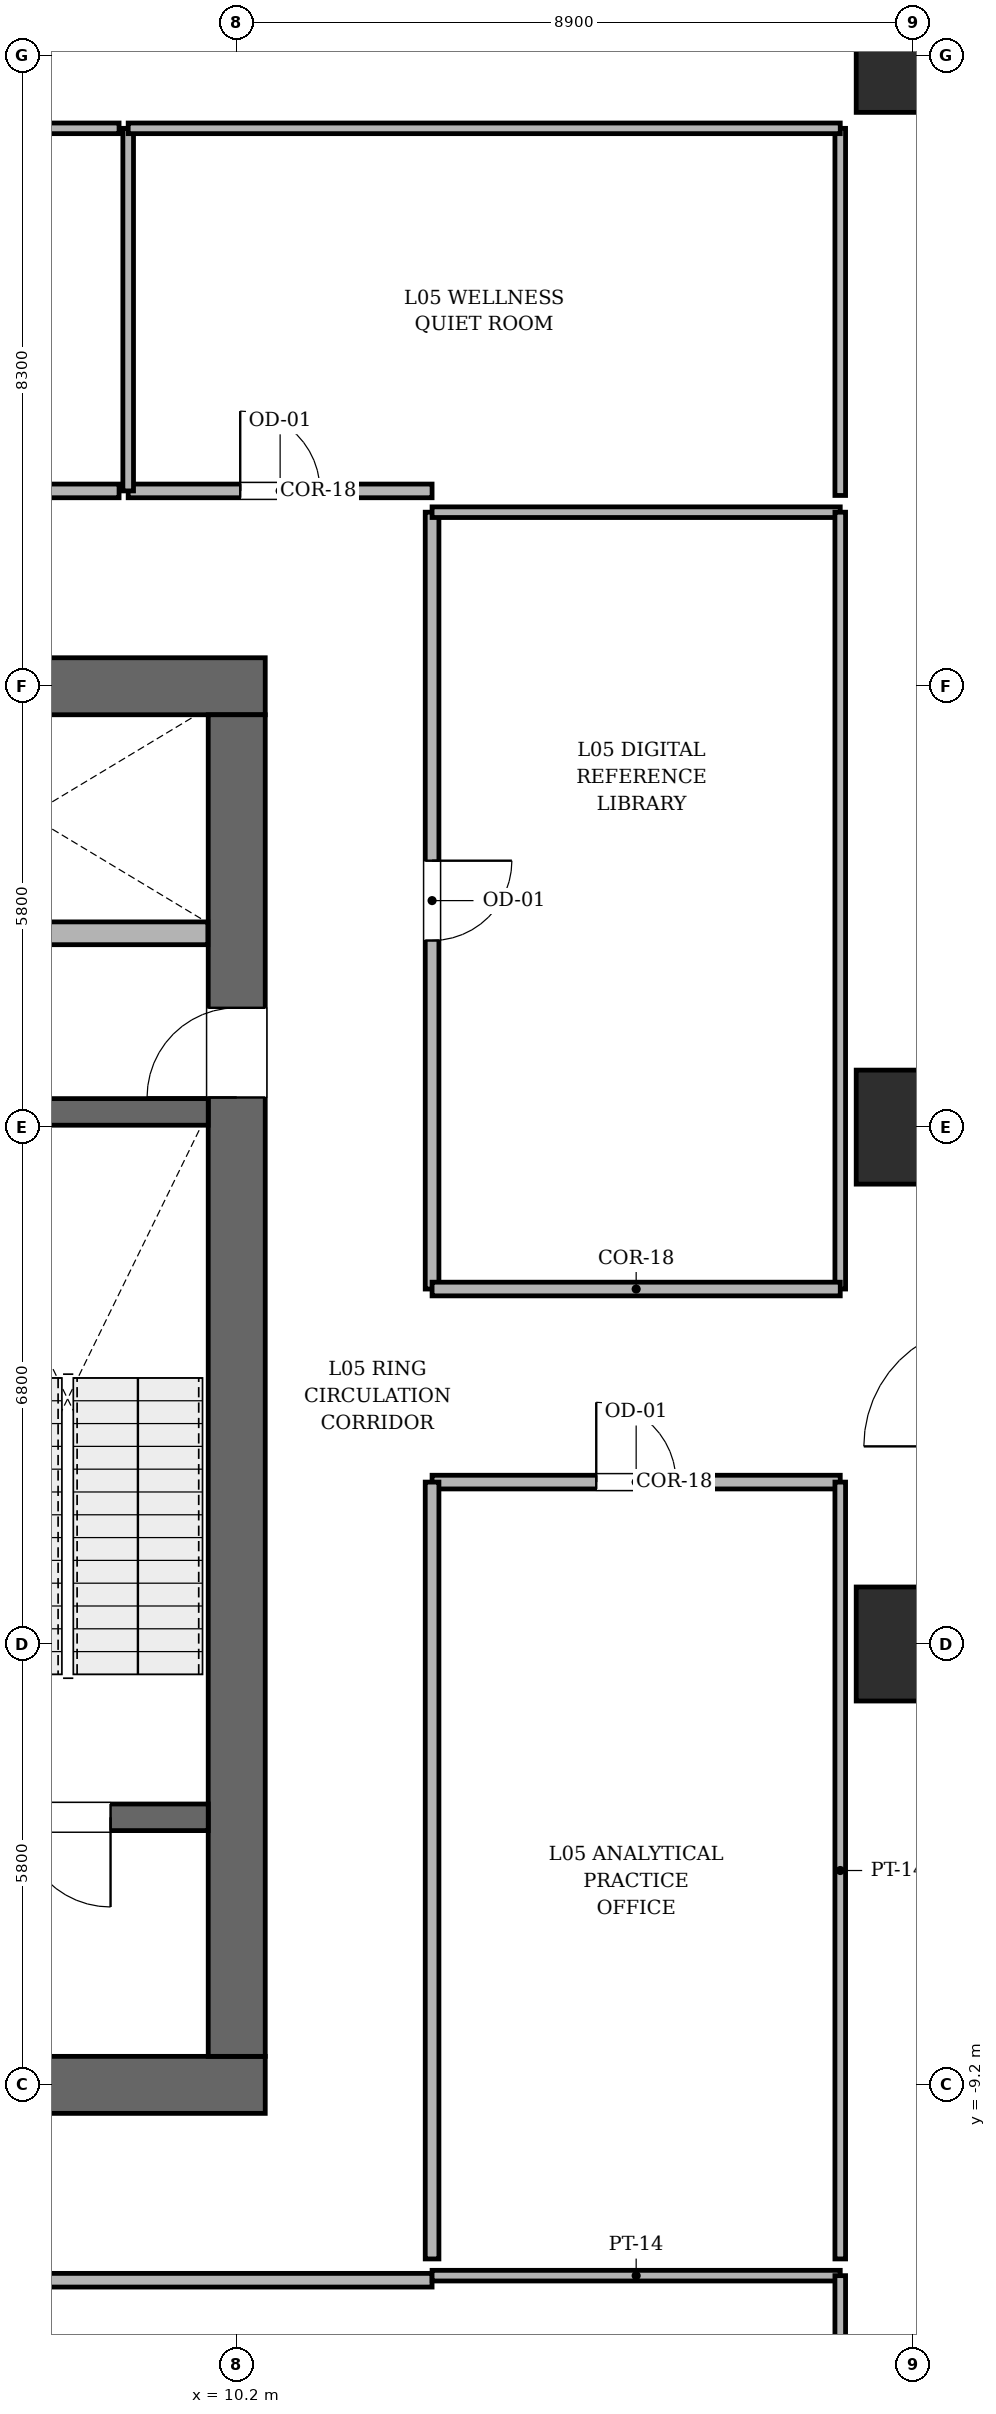
"""IFC4 building model, lengths in metres.
Left out: names, types, materials, properties, quantities, classifications, styles, units other than length and angle.
Written with IfcOpenShell. Run it as: python <this file> out.ifc"""

import sys

from ifc_helpers import new_model, si_unit, direction, frame, frame_2d, origin, origin_2d, place, context, subcontext, project, spatial, rectangle, hollow_rectangle, extrude, element, fill, save


model = new_model("IFC4")
c1 = context("Model", 3, precision=1e-05, world=origin(), true_north=direction((0.0, 1.0)))
c2 = subcontext(c1, "Body", "Model", "MODEL_VIEW")
j1 = project(units=[si_unit("LENGTHUNIT", "METRE"), si_unit("PLANEANGLEUNIT", "RADIAN")], contexts=[c1])
p1 = place(None, origin())
s1 = spatial("IfcSite", under=j1, at=p1, CompositionType="ELEMENT")
p2 = place(p1, origin())
s2 = spatial("IfcBuilding", under=s1, at=p2, CompositionType="ELEMENT")
p3 = place(p2, frame((0.0, 0.0, 28.2)))
s3 = spatial("IfcBuildingStorey", under=s2, at=p3, CompositionType="ELEMENT", Elevation=28.2)
p4 = place(p3, frame((10.575, -9.2, 0.0), z_axis=(0.0, 0.0, 1.0), x_axis=(-1.0, 0.0, 0.0)))
e1 = element("IfcWall", 1, at=p4, inside=s3, PredefinedType="SHEAR", context=c2, shape_type="SweptSolid", body=[
    extrude(rectangle(XDim=21.15, YDim=0.75, at=frame_2d((10.575, 0.0))), origin(), (0.0, 0.0, 1.0), 4.05),
])
p5 = place(p4, frame((2.85, 0.0, 0.0)))
e2 = element("IfcOpeningElement", 2, at=p5, cuts=e1, PredefinedType="OPENING", context=c2, shape_type="SweptSolid", body=[
    extrude(rectangle(XDim=1.25, YDim=2.25, at=frame_2d((0.625, 1.125))), frame((0.0, 0.385, 0.0), z_axis=(0.0, -1.0, 0.0), x_axis=(1.0, 0.0, 0.0)), (0.0, 0.0, 1.0), 0.77),
])
p6 = place(p4, frame((17.05, 0.0, 0.0)))
e3 = element("IfcOpeningElement", 3, at=p6, cuts=e1, PredefinedType="OPENING", context=c2, shape_type="SweptSolid", body=[
    extrude(rectangle(XDim=1.25, YDim=2.25, at=frame_2d((0.625, 1.125))), frame((0.0, 0.385, 0.0), z_axis=(0.0, -1.0, 0.0), x_axis=(1.0, 0.0, 0.0)), (0.0, 0.0, 1.0), 0.77),
])
p7 = place(p3, frame((-10.575, 9.2, 0.0), z_axis=(0.0, 0.0, 1.0), x_axis=(1.0, 0.0, 0.0)))
e4 = element("IfcWall", 4, at=p7, inside=s3, PredefinedType="SHEAR", context=c2, shape_type="SweptSolid", body=[
    extrude(rectangle(XDim=21.15, YDim=0.75, at=frame_2d((10.575, 0.0))), origin(), (0.0, 0.0, 1.0), 4.05),
])
p8 = place(p3, frame((10.2, 8.825, 0.0), z_axis=(0.0, 0.0, 1.0), x_axis=(0.0, -1.0, 0.0)))
e5 = element("IfcWall", 5, at=p8, inside=s3, PredefinedType="SHEAR", context=c2, shape_type="SweptSolid", body=[
    extrude(rectangle(XDim=17.65, YDim=0.75, at=frame_2d((8.825, 0.0))), origin(), (0.0, 0.0, 1.0), 4.05),
])
p9 = place(p8, frame((3.855, 0.0, 0.0)))
e6 = element("IfcOpeningElement", 6, at=p9, cuts=e5, PredefinedType="OPENING", context=c2, shape_type="SweptSolid", body=[
    extrude(rectangle(XDim=1.18, YDim=2.2, at=frame_2d((0.59, 1.1))), frame((0.0, 0.385, 0.0), z_axis=(0.0, -1.0, 0.0), x_axis=(1.0, 0.0, 0.0)), (0.0, 0.0, 1.0), 0.77),
])
p10 = place(p3, frame((4.65, -5.68, 0.0), z_axis=(0.0, 0.0, 1.0), x_axis=(1.0, 0.0, 0.0)))
e7 = element("IfcWall", 7, at=p10, inside=s3, PredefinedType="SOLIDWALL", context=c2, shape_type="SweptSolid", body=[
    extrude(rectangle(XDim=5.175, YDim=0.35, at=frame_2d((2.587, 0.0))), origin(), (0.0, 0.0, 1.0), 4.05),
])
p11 = place(p10, frame((2.71, 0.0, 0.0)))
e8 = element("IfcOpeningElement", 8, at=p11, cuts=e7, PredefinedType="OPENING", context=c2, shape_type="SweptSolid", body=[
    extrude(rectangle(XDim=1.18, YDim=2.2, at=frame_2d((0.59, 1.1))), frame((0.0, 0.185, 0.0), z_axis=(0.0, -1.0, 0.0), x_axis=(1.0, 0.0, 0.0)), (0.0, 0.0, 1.0), 0.37),
])
p12 = place(p3, frame((4.65, 3.6, 0.0), z_axis=(0.0, 0.0, 1.0), x_axis=(1.0, 0.0, 0.0)))
e9 = element("IfcWall", 9, at=p12, inside=s3, PredefinedType="SOLIDWALL", context=c2, shape_type="SweptSolid", body=[
    extrude(rectangle(XDim=5.175, YDim=0.35, at=frame_2d((2.587, 0.0))), origin(), (0.0, 0.0, 1.0), 4.05),
])
for number, where, z_axis, x_axis in (
    (10, (19.1, -3.4, 0.0), (0.0, 0.0, 1.0), (1.0, 0.0, 0.0)),
    (11, (19.1, 3.4, 0.0), (0.0, 0.0, 1.0), (1.0, 0.0, 0.0)),
    (12, (19.1, 17.5, 0.0), (0.0, 0.0, 1.0), (1.0, 0.0, 0.0)),
):
    element("IfcColumn", number, at=place(p3, frame(where, z_axis=z_axis, x_axis=x_axis)), inside=s3, PredefinedType="COLUMN", context=c2, shape_type="SweptSolid", body=[
        extrude(hollow_rectangle(XDim=1.5, YDim=1.5, WallThickness=0.045, at=origin_2d()), origin(), (0.0, 0.0, 1.0), 4.05),
    ])
p13 = place(p3, frame((19.646, 16.949, 0.0), z_axis=(0.0, 0.0, 1.0), x_axis=(-0.707106781187, 0.707106781187, 0.0)))
e13 = element("IfcWall", 13, at=p13, inside=s3, PredefinedType="SOLIDWALL", context=c2, shape_type="SweptSolid", body=[
    extrude(rectangle(XDim=1.552, YDim=0.32, at=frame_2d((0.776, 0.0))), origin(), (0.0, 0.0, 1.0), 3.104),
])
p14 = place(p3, frame((5.06, 5.95, 0.0), z_axis=(0.0, 0.0, 1.0), x_axis=(1.0, 0.0, 0.0)))
e14 = element("IfcWall", 14, at=p14, inside=s3, PredefinedType="SOLIDWALL", context=c2, shape_type="SweptSolid", body=[
    extrude(rectangle(XDim=4.76, YDim=0.3, at=frame_2d((2.38, 0.0))), origin(), (0.0, 0.0, 1.0), 3.81),
])
p15 = place(p3, frame((-12.77, -11.77, 0.0), z_axis=(0.0, 0.0, 1.0), x_axis=(1.0, 0.0, 0.0)))
e15 = element("IfcWall", 15, at=p15, inside=s3, PredefinedType="PARTITIONING", context=c2, shape_type="SweptSolid", body=[
    extrude(rectangle(XDim=25.54, YDim=0.18, at=frame_2d((12.77, 0.0))), origin(), (0.0, 0.0, 1.0), 3.104),
])
p16 = place(p15, frame((12.245, 0.0, 0.0)))
e16 = element("IfcOpeningElement", 16, at=p16, cuts=e15, PredefinedType="OPENING", context=c2, shape_type="SweptSolid", body=[
    extrude(rectangle(XDim=1.05, YDim=2.2, at=frame_2d((0.525, 1.1))), frame((0.0, 0.1, 0.0), z_axis=(0.0, -1.0, 0.0), x_axis=(1.0, 0.0, 0.0)), (0.0, 0.0, 1.0), 0.2),
])
p17 = place(p3, frame((12.77, -11.71, 0.0), z_axis=(0.0, 0.0, 1.0), x_axis=(1.0, 0.0, 0.0)))
e17 = element("IfcWall", 17, at=p17, inside=s3, PredefinedType="PARTITIONING", context=c2, shape_type="SweptSolid", body=[
    extrude(rectangle(XDim=5.37, YDim=0.14, at=frame_2d((2.685, 0.0))), origin(), (0.0, 0.0, 1.0), 3.354),
])
p18 = place(p3, frame((18.14, -11.71, 0.0), z_axis=(0.0, 0.0, 1.0), x_axis=(0.0, -1.0, 0.0)))
e18 = element("IfcWall", 18, at=p18, inside=s3, PredefinedType="PARTITIONING", context=c2, shape_type="SweptSolid", body=[
    extrude(rectangle(XDim=10.73, YDim=0.14, at=frame_2d((5.365, 0.0))), origin(), (0.0, 0.0, 1.0), 3.104),
])
p19 = place(p3, frame((12.77, -1.27, 0.0), z_axis=(0.0, 0.0, 1.0), x_axis=(1.0, 0.0, 0.0)))
e19 = element("IfcWall", 19, at=p19, inside=s3, PredefinedType="PARTITIONING", context=c2, shape_type="SweptSolid", body=[
    extrude(rectangle(XDim=5.37, YDim=0.18, at=frame_2d((2.685, 0.0))), origin(), (0.0, 0.0, 1.0), 3.81),
])
p20 = place(p19, frame((2.16, 0.0, 0.0)))
e20 = element("IfcOpeningElement", 20, at=p20, cuts=e19, PredefinedType="OPENING", context=c2, shape_type="SweptSolid", body=[
    extrude(rectangle(XDim=1.05, YDim=2.2, at=frame_2d((0.525, 1.1))), frame((0.0, 0.1, 0.0), z_axis=(0.0, -1.0, 0.0), x_axis=(1.0, 0.0, 0.0)), (0.0, 0.0, 1.0), 0.2),
])
p21 = place(p3, frame((18.14, -1.27, 0.0), z_axis=(0.0, 0.0, 1.0), x_axis=(0.0, -1.0, 0.0)))
e21 = element("IfcWall", 21, at=p21, inside=s3, PredefinedType="PARTITIONING", context=c2, shape_type="SweptSolid", body=[
    extrude(rectangle(XDim=10.22, YDim=0.14, at=frame_2d((5.11, 0.0))), origin(), (0.0, 0.0, 1.0), 3.104),
])
p22 = place(p3, frame((12.77, -11.49, 0.0), z_axis=(0.0, 0.0, 1.0), x_axis=(0.0, 1.0, 0.0)))
e22 = element("IfcWall", 22, at=p22, inside=s3, PredefinedType="PARTITIONING", context=c2, shape_type="SweptSolid", body=[
    extrude(rectangle(XDim=10.22, YDim=0.18, at=frame_2d((5.11, 0.0))), origin(), (0.0, 0.0, 1.0), 3.104),
])
p23 = place(p3, frame((12.77, 1.27, 0.0), z_axis=(0.0, 0.0, 1.0), x_axis=(0.0, 1.0, 0.0)))
e23 = element("IfcWall", 23, at=p23, inside=s3, PredefinedType="PARTITIONING", context=c2, shape_type="SweptSolid", body=[
    extrude(rectangle(XDim=10.22, YDim=0.18, at=frame_2d((5.11, 0.0))), origin(), (0.0, 0.0, 1.0), 3.104),
])
p24 = place(p23, frame((4.585, 0.0, 0.0)))
e24 = element("IfcOpeningElement", 24, at=p24, cuts=e23, PredefinedType="OPENING", context=c2, shape_type="SweptSolid", body=[
    extrude(rectangle(XDim=1.05, YDim=2.2, at=frame_2d((0.525, 1.1))), frame((0.0, 0.1, 0.0), z_axis=(0.0, -1.0, 0.0), x_axis=(1.0, 0.0, 0.0)), (0.0, 0.0, 1.0), 0.2),
])
p25 = place(p3, frame((12.77, 11.49, 0.0), z_axis=(0.0, 0.0, 1.0), x_axis=(1.0, 0.0, 0.0)))
e25 = element("IfcWall", 25, at=p25, inside=s3, PredefinedType="PARTITIONING", context=c2, shape_type="SweptSolid", body=[
    extrude(rectangle(XDim=5.37, YDim=0.14, at=frame_2d((2.685, 0.0))), origin(), (0.0, 0.0, 1.0), 3.354),
])
p26 = place(p3, frame((18.14, 11.49, 0.0), z_axis=(0.0, 0.0, 1.0), x_axis=(0.0, -1.0, 0.0)))
e26 = element("IfcWall", 26, at=p26, inside=s3, PredefinedType="PARTITIONING", context=c2, shape_type="SweptSolid", body=[
    extrude(rectangle(XDim=10.22, YDim=0.14, at=frame_2d((5.11, 0.0))), origin(), (0.0, 0.0, 1.0), 3.104),
])
p27 = place(p3, frame((18.14, 1.27, 0.0), z_axis=(0.0, 0.0, 1.0), x_axis=(-1.0, 0.0, 0.0)))
e27 = element("IfcWall", 27, at=p27, inside=s3, PredefinedType="PARTITIONING", context=c2, shape_type="SweptSolid", body=[
    extrude(rectangle(XDim=5.37, YDim=0.18, at=frame_2d((2.685, 0.0))), origin(), (0.0, 0.0, 1.0), 3.81),
])
p28 = place(p3, frame((18.14, 16.54, 0.0), z_axis=(0.0, 0.0, 1.0), x_axis=(0.0, -1.0, 0.0)))
e28 = element("IfcWall", 28, at=p28, inside=s3, PredefinedType="PARTITIONING", context=c2, shape_type="SweptSolid", body=[
    extrude(rectangle(XDim=4.83, YDim=0.14, at=frame_2d((2.415, 0.0))), origin(), (0.0, 0.0, 1.0), 3.354),
])
p29 = place(p3, frame((12.77, 11.77, 0.0), z_axis=(0.0, 0.0, 1.0), x_axis=(-1.0, 0.0, 0.0)))
e29 = element("IfcWall", 29, at=p29, inside=s3, PredefinedType="PARTITIONING", context=c2, shape_type="SweptSolid", body=[
    extrude(rectangle(XDim=3.998, YDim=0.18, at=frame_2d((1.999, 0.0))), origin(), (0.0, 0.0, 1.0), 3.104),
])
p30 = place(p29, frame((1.474, 0.0, 0.0)))
e30 = element("IfcOpeningElement", 30, at=p30, cuts=e29, PredefinedType="OPENING", context=c2, shape_type="SweptSolid", body=[
    extrude(rectangle(XDim=1.05, YDim=2.2, at=frame_2d((0.525, 1.1))), frame((0.0, 0.1, 0.0), z_axis=(0.0, -1.0, 0.0), x_axis=(1.0, 0.0, 0.0)), (0.0, 0.0, 1.0), 0.2),
])
p31 = place(p3, frame((8.772, 11.77, 0.0), z_axis=(0.0, 0.0, 1.0), x_axis=(0.0, 1.0, 0.0)))
e31 = element("IfcWall", 31, at=p31, inside=s3, PredefinedType="PARTITIONING", context=c2, shape_type="SweptSolid", body=[
    extrude(rectangle(XDim=4.77, YDim=0.14, at=frame_2d((2.385, 0.0))), origin(), (0.0, 0.0, 1.0), 3.81),
])
p32 = place(p3, frame((8.772, 16.54, 0.0), z_axis=(0.0, 0.0, 1.0), x_axis=(1.0, 0.0, 0.0)))
e32 = element("IfcWall", 32, at=p32, inside=s3, PredefinedType="PARTITIONING", context=c2, shape_type="SweptSolid", body=[
    extrude(rectangle(XDim=9.368, YDim=0.14, at=frame_2d((4.684, 0.0))), origin(), (0.0, 0.0, 1.0), 3.104),
])
p33 = place(p3, frame((8.652, 11.77, 0.0), z_axis=(0.0, 0.0, 1.0), x_axis=(-1.0, 0.0, 0.0)))
e33 = element("IfcWall", 33, at=p33, inside=s3, PredefinedType="PARTITIONING", context=c2, shape_type="SweptSolid", body=[
    extrude(rectangle(XDim=17.937, YDim=0.18, at=frame_2d((8.969, 0.0))), origin(), (0.0, 0.0, 1.0), 3.104),
])
p34 = place(p33, frame((8.444, 0.0, 0.0)))
e34 = element("IfcOpeningElement", 34, at=p34, cuts=e33, PredefinedType="OPENING", context=c2, shape_type="SweptSolid", body=[
    extrude(rectangle(XDim=1.05, YDim=2.2, at=frame_2d((0.525, 1.1))), frame((0.0, 0.1, 0.0), z_axis=(0.0, -1.0, 0.0), x_axis=(1.0, 0.0, 0.0)), (0.0, 0.0, 1.0), 0.2),
])
p35 = place(p3, frame((-9.285, 16.54, 0.0), z_axis=(0.0, 0.0, 1.0), x_axis=(1.0, 0.0, 0.0)))
e35 = element("IfcWall", 35, at=p35, inside=s3, PredefinedType="PARTITIONING", context=c2, shape_type="SweptSolid", body=[
    extrude(rectangle(XDim=17.937, YDim=0.14, at=frame_2d((8.969, 0.0))), origin(), (0.0, 0.0, 1.0), 3.104),
])
p36 = place(p11, origin())
e36 = element("IfcDoor", 36, at=p36, inside=s3, OperationType="SINGLE_SWING_RIGHT", PredefinedType="DOOR", context=c2, shape_type="SweptSolid", body=[
    extrude(rectangle(XDim=1.18, YDim=2.2, at=frame_2d((0.59, 1.1))), frame((0.0, 0.025, 0.0), z_axis=(0.0, -1.0, 0.0), x_axis=(1.0, 0.0, 0.0)), (0.0, 0.0, 1.0), 0.05),
])
fill(e8, e36)
p37 = place(p9, origin())
e37 = element("IfcDoor", 37, at=p37, inside=s3, OperationType="SINGLE_SWING_RIGHT", PredefinedType="DOOR", context=c2, shape_type="SweptSolid", body=[
    extrude(rectangle(XDim=1.18, YDim=2.2, at=frame_2d((0.59, 1.1))), frame((0.0, 0.025, 0.0), z_axis=(0.0, -1.0, 0.0), x_axis=(1.0, 0.0, 0.0)), (0.0, 0.0, 1.0), 0.05),
])
fill(e6, e37)
p38 = place(p20, origin())
e38 = element("IfcDoor", 38, at=p38, inside=s3, OperationType="SINGLE_SWING_LEFT", PredefinedType="DOOR", context=c2, shape_type="SweptSolid", body=[
    extrude(rectangle(XDim=1.05, YDim=2.2, at=frame_2d((0.525, 1.1))), frame((0.0, 0.025, 0.0), z_axis=(0.0, -1.0, 0.0), x_axis=(1.0, 0.0, 0.0)), (0.0, 0.0, 1.0), 0.05),
])
fill(e20, e38)
p39 = place(p24, origin())
e39 = element("IfcDoor", 39, at=p39, inside=s3, OperationType="SINGLE_SWING_RIGHT", PredefinedType="DOOR", context=c2, shape_type="SweptSolid", body=[
    extrude(rectangle(XDim=1.05, YDim=2.2, at=frame_2d((0.525, 1.1))), frame((0.0, 0.025, 0.0), z_axis=(0.0, -1.0, 0.0), x_axis=(1.0, 0.0, 0.0)), (0.0, 0.0, 1.0), 0.05),
])
fill(e24, e39)
p40 = place(p30, origin())
e40 = element("IfcDoor", 40, at=p40, inside=s3, OperationType="SINGLE_SWING_RIGHT", PredefinedType="DOOR", context=c2, shape_type="SweptSolid", body=[
    extrude(rectangle(XDim=1.05, YDim=2.2, at=frame_2d((0.525, 1.1))), frame((0.0, 0.025, 0.0), z_axis=(0.0, -1.0, 0.0), x_axis=(1.0, 0.0, 0.0)), (0.0, 0.0, 1.0), 0.05),
])
fill(e30, e40)
save(model, sys.argv[1])
